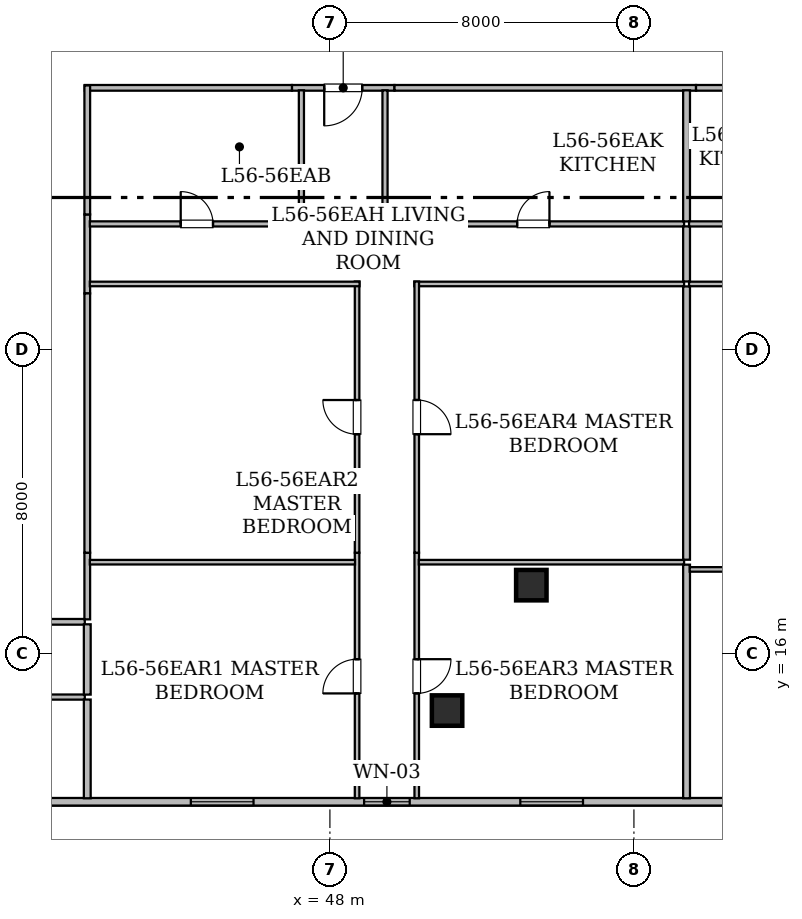
"""IFC4 building model, lengths in metres.
Left out: names, types, materials, properties, quantities, classifications, styles, units other than length and angle.
Written with IfcOpenShell. Run it as: python <this file> out.ifc"""

import sys

from ifc_helpers import new_model, si_unit, direction, frame, frame_2d, origin, origin_2d, place, context, subcontext, project, spatial, rectangle, hollow_rectangle, extrude, element, fill, save


model = new_model("IFC4")
c1 = context("Model", 3, precision=1e-05, world=origin(), true_north=direction((0.0, 1.0)))
c2 = subcontext(c1, "Body", "Model", "MODEL_VIEW")
j1 = project(units=[si_unit("LENGTHUNIT", "METRE"), si_unit("PLANEANGLEUNIT", "RADIAN")], contexts=[c1])
p1 = place(None, origin())
s1 = spatial("IfcSite", under=j1, at=p1, CompositionType="ELEMENT")
p2 = place(p1, origin())
s2 = spatial("IfcBuilding", under=s1, at=p2, CompositionType="ELEMENT")
p3 = place(p2, frame((0.0, 0.0, 220.85)))
s3 = spatial("IfcBuildingStorey", under=s2, at=p3, CompositionType="ELEMENT", Elevation=220.85)
for number, where, z_axis, x_axis in (
    (1, (51.083, 14.5, 0.0), (0.0, 0.0, 1.0), (1.0, 0.0, 0.0)),
    (2, (53.3, 17.8, 0.0), (0.0, 0.0, 1.0), (1.0, 0.0, 0.0)),
):
    element("IfcColumn", number, at=place(p3, frame(where, z_axis=z_axis, x_axis=x_axis)), inside=s3, PredefinedType="COLUMN", context=c2, shape_type="SweptSolid", body=[
        extrude(hollow_rectangle(XDim=0.8, YDim=0.8, WallThickness=0.04, at=origin_2d()), origin(), (0.0, 0.0, 1.0), 3.65),
    ])
p4 = place(p3, frame((65.696, 12.1, 0.0), z_axis=(0.0, 0.0, 1.0), x_axis=(-1.0, 0.0, 0.0)))
e3 = element("IfcWall", 3, at=p4, inside=s3, PredefinedType="STANDARD", context=c2, shape_type="SweptSolid", body=[
    extrude(rectangle(XDim=41.393, YDim=0.2, at=frame_2d((20.697, 0.0))), origin(), (0.0, 0.0, 1.0), 3.43),
])
p5 = place(p4, frame((34.521, 0.0, 0.85)))
e4 = element("IfcOpeningElement", 4, at=p5, cuts=e3, PredefinedType="OPENING", context=c2, shape_type="SweptSolid", body=[
    extrude(rectangle(XDim=1.65, YDim=1.55, at=frame_2d((0.825, 0.775))), frame((0.0, 0.11, 0.0), z_axis=(0.0, -1.0, 0.0), x_axis=(1.0, 0.0, 0.0)), (0.0, 0.0, 1.0), 0.22),
])
p6 = place(p4, frame((39.14, 0.0, 0.85)))
e5 = element("IfcOpeningElement", 5, at=p6, cuts=e3, PredefinedType="OPENING", context=c2, shape_type="SweptSolid", body=[
    extrude(rectangle(XDim=1.65, YDim=1.55, at=frame_2d((0.825, 0.775))), frame((0.0, 0.11, 0.0), z_axis=(0.0, -1.0, 0.0), x_axis=(1.0, 0.0, 0.0)), (0.0, 0.0, 1.0), 0.22),
])
p7 = place(p4, frame((15.596, 0.0, 0.8)))
e6 = element("IfcOpeningElement", 6, at=p7, cuts=e3, PredefinedType="OPENING", context=c2, shape_type="SweptSolid", body=[
    extrude(rectangle(XDim=1.2, YDim=1.5, at=frame_2d((0.6, 0.75))), frame((0.0, 0.11, 0.0), z_axis=(0.0, -1.0, 0.0), x_axis=(1.0, 0.0, 0.0)), (0.0, 0.0, 1.0), 0.22),
])
p8 = place(p4, frame((19.706, 0.0, 0.85)))
e7 = element("IfcOpeningElement", 7, at=p8, cuts=e3, PredefinedType="OPENING", context=c2, shape_type="SweptSolid", body=[
    extrude(rectangle(XDim=1.65, YDim=1.55, at=frame_2d((0.825, 0.775))), frame((0.0, 0.11, 0.0), z_axis=(0.0, -1.0, 0.0), x_axis=(1.0, 0.0, 0.0)), (0.0, 0.0, 1.0), 0.22),
])
p9 = place(p4, frame((11.036, 0.0, 0.85)))
e8 = element("IfcOpeningElement", 8, at=p9, cuts=e3, PredefinedType="OPENING", context=c2, shape_type="SweptSolid", body=[
    extrude(rectangle(XDim=1.65, YDim=1.55, at=frame_2d((0.825, 0.775))), frame((0.0, 0.11, 0.0), z_axis=(0.0, -1.0, 0.0), x_axis=(1.0, 0.0, 0.0)), (0.0, 0.0, 1.0), 0.22),
])
p10 = place(p4, frame((4.786, 0.0, 0.85)))
e9 = element("IfcOpeningElement", 9, at=p10, cuts=e3, PredefinedType="OPENING", context=c2, shape_type="SweptSolid", body=[
    extrude(rectangle(XDim=1.65, YDim=1.55, at=frame_2d((0.825, 0.775))), frame((0.0, 0.11, 0.0), z_axis=(0.0, -1.0, 0.0), x_axis=(1.0, 0.0, 0.0)), (0.0, 0.0, 1.0), 0.22),
])
p11 = place(p3, frame((41.55, 16.835, 0.0), z_axis=(0.0, 0.0, 1.0), x_axis=(-1.0, 0.0, 0.0)))
e10 = element("IfcWall", 10, at=p11, inside=s3, PredefinedType="STANDARD", context=c2, shape_type="SweptSolid", body=[
    extrude(rectangle(XDim=7.436, YDim=0.15, at=frame_2d((3.718, 0.0))), origin(), (0.0, 0.0, 1.0), 2.725),
])
p12 = place(p11, frame((3.218, 0.0, 0.0)))
e11 = element("IfcOpeningElement", 11, at=p12, cuts=e10, PredefinedType="OPENING", context=c2, shape_type="SweptSolid", body=[
    extrude(rectangle(XDim=1.0, YDim=2.15, at=frame_2d((0.5, 1.075))), frame((0.0, 0.085, 0.0), z_axis=(0.0, -1.0, 0.0), x_axis=(1.0, 0.0, 0.0)), (0.0, 0.0, 1.0), 0.17),
])
p13 = place(p3, frame((49.699, 30.885, 0.0), z_axis=(0.0, 0.0, 1.0), x_axis=(-1.0, 0.0, 0.0)))
e12 = element("IfcWall", 12, at=p13, inside=s3, PredefinedType="STANDARD", context=c2, shape_type="SweptSolid", body=[
    extrude(rectangle(XDim=2.698, YDim=0.15, at=frame_2d((1.349, 0.0))), origin(), (0.0, 0.0, 1.0), 3.43),
])
p14 = place(p13, frame((0.849, 0.0, 0.0)))
e13 = element("IfcOpeningElement", 13, at=p14, cuts=e12, PredefinedType="OPENING", context=c2, shape_type="SweptSolid", body=[
    extrude(rectangle(XDim=1.0, YDim=2.15, at=frame_2d((0.5, 1.075))), frame((0.0, 0.085, 0.0), z_axis=(0.0, -1.0, 0.0), x_axis=(1.0, 0.0, 0.0)), (0.0, 0.0, 1.0), 0.17),
])
p15 = place(p3, frame((41.615, 27.554, 0.0), z_axis=(0.0, 0.0, 1.0), x_axis=(0.0, -1.0, 0.0)))
e14 = element("IfcWall", 14, at=p15, inside=s3, PredefinedType="STANDARD", context=c2, shape_type="SweptSolid", body=[
    extrude(rectangle(XDim=2.078, YDim=0.15, at=frame_2d((1.039, 0.0))), origin(), (0.0, 0.0, 1.0), 3.43),
])
p16 = place(p3, frame((47.001, 30.885, 0.0), z_axis=(0.0, 0.0, 1.0), x_axis=(-1.0, 0.0, 0.0)))
e15 = element("IfcWall", 15, at=p16, inside=s3, PredefinedType="STANDARD", context=c2, shape_type="SweptSolid", body=[
    extrude(rectangle(XDim=5.451, YDim=0.15, at=frame_2d((2.726, 0.0))), origin(), (0.0, 0.0, 1.0), 3.43),
])
p17 = place(p3, frame((41.615, 30.948, 0.0), z_axis=(0.0, 0.0, 1.0), x_axis=(0.0, -1.0, 0.0)))
e16 = element("IfcWall", 16, at=p17, inside=s3, PredefinedType="STANDARD", context=c2, shape_type="SweptSolid", body=[
    extrude(rectangle(XDim=3.394, YDim=0.15, at=frame_2d((1.697, 0.0))), origin(), (0.0, 0.0, 1.0), 3.43),
])
p18 = place(p3, frame((57.634, 30.885, 0.0), z_axis=(0.0, 0.0, 1.0), x_axis=(-1.0, 0.0, 0.0)))
e17 = element("IfcWall", 17, at=p18, inside=s3, PredefinedType="STANDARD", context=c2, shape_type="SweptSolid", body=[
    extrude(rectangle(XDim=7.935, YDim=0.15, at=frame_2d((3.968, 0.0))), origin(), (0.0, 0.0, 1.0), 2.725),
])
p19 = place(p3, frame((41.615, 18.653, 0.0), z_axis=(0.0, 0.0, 1.0), x_axis=(0.0, -1.0, 0.0)))
e18 = element("IfcWall", 18, at=p19, inside=s3, PredefinedType="STANDARD", context=c2, shape_type="SweptSolid", body=[
    extrude(rectangle(XDim=1.753, YDim=0.15, at=frame_2d((0.876, 0.0))), origin(), (0.0, 0.0, 1.0), 2.725),
])
p20 = place(p3, frame((41.615, 25.476, 0.0), z_axis=(0.0, 0.0, 1.0), x_axis=(0.0, -1.0, 0.0)))
e19 = element("IfcWall", 19, at=p20, inside=s3, PredefinedType="STANDARD", context=c2, shape_type="SweptSolid", body=[
    extrude(rectangle(XDim=6.823, YDim=0.15, at=frame_2d((3.412, 0.0))), origin(), (0.0, 0.0, 1.0), 2.725),
])
p21 = place(p3, frame((62.142, 30.885, 0.0), z_axis=(0.0, 0.0, 1.0), x_axis=(-1.0, 0.0, 0.0)))
e20 = element("IfcWall", 20, at=p21, inside=s3, PredefinedType="STANDARD", context=c2, shape_type="SweptSolid", body=[
    extrude(rectangle(XDim=4.508, YDim=0.15, at=frame_2d((2.254, 0.0))), origin(), (0.0, 0.0, 1.0), 3.43),
])
p22 = place(p3, frame((41.55, 14.855, 0.0), z_axis=(0.0, 0.0, 1.0), x_axis=(-1.0, 0.0, 0.0)))
e21 = element("IfcWall", 21, at=p22, inside=s3, PredefinedType="PARTITIONING", context=c2, shape_type="SweptSolid", body=[
    extrude(rectangle(XDim=3.713, YDim=0.135, at=frame_2d((1.856, 0.0))), origin(), (0.0, 0.0, 1.0), 2.725),
])
p23 = place(p22, frame((1.221, 0.0, 0.0)))
e22 = element("IfcOpeningElement", 22, at=p23, cuts=e21, PredefinedType="OPENING", context=c2, shape_type="SweptSolid", body=[
    extrude(rectangle(XDim=0.85, YDim=2.1, at=frame_2d((0.425, 1.05))), frame((0.0, 0.077, 0.0), z_axis=(0.0, -1.0, 0.0), x_axis=(1.0, 0.0, 0.0)), (0.0, 0.0, 1.0), 0.155),
])
p24 = place(p3, frame((41.615, 16.77, 0.0), z_axis=(0.0, 0.0, 1.0), x_axis=(0.0, -1.0, 0.0)))
e23 = element("IfcWall", 23, at=p24, inside=s3, PredefinedType="STANDARD", context=c2, shape_type="SweptSolid", body=[
    extrude(rectangle(XDim=1.85, YDim=0.18, at=frame_2d((0.925, 0.0))), origin(), (0.0, 0.0, 1.0), 3.065),
])
p25 = place(p3, frame((41.615, 14.79, 0.0), z_axis=(0.0, 0.0, 1.0), x_axis=(0.0, -1.0, 0.0)))
e24 = element("IfcWall", 24, at=p25, inside=s3, PredefinedType="STANDARD", context=c2, shape_type="SweptSolid", body=[
    extrude(rectangle(XDim=2.598, YDim=0.18, at=frame_2d((1.299, 0.0))), origin(), (0.0, 0.0, 1.0), 2.887),
])
p26 = place(p3, frame((41.682, 27.305, 0.0), z_axis=(0.0, 0.0, 1.0), x_axis=(1.0, 0.0, 0.0)))
e25 = element("IfcWall", 25, at=p26, inside=s3, PredefinedType="PARTITIONING", context=c2, shape_type="SweptSolid", body=[
    extrude(rectangle(XDim=5.633, YDim=0.135, at=frame_2d((2.816, 0.0))), origin(), (0.0, 0.0, 1.0), 3.43),
])
p27 = place(p26, frame((2.392, 0.0, 0.0)))
e26 = element("IfcOpeningElement", 26, at=p27, cuts=e25, PredefinedType="OPENING", context=c2, shape_type="SweptSolid", body=[
    extrude(rectangle(XDim=0.85, YDim=2.1, at=frame_2d((0.425, 1.05))), frame((0.0, 0.077, 0.0), z_axis=(0.0, -1.0, 0.0), x_axis=(1.0, 0.0, 0.0)), (0.0, 0.0, 1.0), 0.155),
])
for number, where, z_axis, x_axis in (
    (27, (47.25, 27.24, 0.0), (0.0, 0.0, 1.0), (0.0, 1.0, 0.0)),
    (28, (49.45, 30.82, 0.0), (0.0, 0.0, 1.0), (0.0, -1.0, 0.0)),
):
    element("IfcWall", number, at=place(p3, frame(where, z_axis=z_axis, x_axis=x_axis)), inside=s3, PredefinedType="PARTITIONING", context=c2, shape_type="SweptSolid", body=[
        extrude(rectangle(XDim=3.58, YDim=0.135, at=frame_2d((1.79, 0.0))), origin(), (0.0, 0.0, 1.0), 3.43),
    ])
p28 = place(p3, frame((49.385, 27.305, 0.0), z_axis=(0.0, 0.0, 1.0), x_axis=(1.0, 0.0, 0.0)))
e29 = element("IfcWall", 29, at=p28, inside=s3, PredefinedType="PARTITIONING", context=c2, shape_type="SweptSolid", body=[
    extrude(rectangle(XDim=7.935, YDim=0.135, at=frame_2d((3.968, 0.0))), origin(), (0.0, 0.0, 1.0), 2.725),
])
p29 = place(p28, frame((3.542, 0.0, 0.0)))
e30 = element("IfcOpeningElement", 30, at=p29, cuts=e29, PredefinedType="OPENING", context=c2, shape_type="SweptSolid", body=[
    extrude(rectangle(XDim=0.85, YDim=2.1, at=frame_2d((0.425, 1.05))), frame((0.0, 0.077, 0.0), z_axis=(0.0, -1.0, 0.0), x_axis=(1.0, 0.0, 0.0)), (0.0, 0.0, 1.0), 0.155),
])
p30 = place(p3, frame((48.715, 12.192, 0.0), z_axis=(0.0, 0.0, 1.0), x_axis=(0.0, 1.0, 0.0)))
e31 = element("IfcWall", 31, at=p30, inside=s3, PredefinedType="PARTITIONING", context=c2, shape_type="SweptSolid", body=[
    extrude(rectangle(XDim=6.461, YDim=0.12, at=frame_2d((3.23, 0.0))), origin(), (0.0, 0.0, 1.0), 2.725),
])
p31 = place(p30, frame((2.759, 0.0, 0.0)))
e32 = element("IfcOpeningElement", 32, at=p31, cuts=e31, PredefinedType="OPENING", context=c2, shape_type="SweptSolid", body=[
    extrude(rectangle(XDim=0.9, YDim=2.1, at=frame_2d((0.45, 1.05))), frame((0.0, 0.07, 0.0), z_axis=(0.0, -1.0, 0.0), x_axis=(1.0, 0.0, 0.0)), (0.0, 0.0, 1.0), 0.14),
])
p32 = place(p3, frame((48.715, 18.653, 0.0), z_axis=(0.0, 0.0, 1.0), x_axis=(0.0, 1.0, 0.0)))
e33 = element("IfcWall", 33, at=p32, inside=s3, PredefinedType="PARTITIONING", context=c2, shape_type="SweptSolid", body=[
    extrude(rectangle(XDim=7.137, YDim=0.12, at=frame_2d((3.568, 0.0))), origin(), (0.0, 0.0, 1.0), 3.43),
])
p33 = place(p32, frame((3.118, 0.0, 0.0)))
e34 = element("IfcOpeningElement", 34, at=p33, cuts=e33, PredefinedType="OPENING", context=c2, shape_type="SweptSolid", body=[
    extrude(rectangle(XDim=0.9, YDim=2.1, at=frame_2d((0.45, 1.05))), frame((0.0, 0.07, 0.0), z_axis=(0.0, -1.0, 0.0), x_axis=(1.0, 0.0, 0.0)), (0.0, 0.0, 1.0), 0.14),
])
p34 = place(p3, frame((48.78, 25.725, 0.0), z_axis=(0.0, 0.0, 1.0), x_axis=(-1.0, 0.0, 0.0)))
e35 = element("IfcWall", 35, at=p34, inside=s3, PredefinedType="PARTITIONING", context=c2, shape_type="SweptSolid", body=[
    extrude(rectangle(XDim=7.098, YDim=0.12, at=frame_2d((3.549, 0.0))), origin(), (0.0, 0.0, 1.0), 3.43),
])
p35 = place(p3, frame((50.285, 18.653, 0.0), z_axis=(0.0, 0.0, 1.0), x_axis=(0.0, -1.0, 0.0)))
e36 = element("IfcWall", 36, at=p35, inside=s3, PredefinedType="PARTITIONING", context=c2, shape_type="SweptSolid", body=[
    extrude(rectangle(XDim=6.461, YDim=0.12, at=frame_2d((3.23, 0.0))), origin(), (0.0, 0.0, 1.0), 2.725),
])
p36 = place(p35, frame((2.801, 0.0, 0.0)))
e37 = element("IfcOpeningElement", 37, at=p36, cuts=e36, PredefinedType="OPENING", context=c2, shape_type="SweptSolid", body=[
    extrude(rectangle(XDim=0.9, YDim=2.1, at=frame_2d((0.45, 1.05))), frame((0.0, 0.07, 0.0), z_axis=(0.0, -1.0, 0.0), x_axis=(1.0, 0.0, 0.0)), (0.0, 0.0, 1.0), 0.14),
])
p37 = place(p3, frame((57.32, 25.725, 0.0), z_axis=(0.0, 0.0, 1.0), x_axis=(-1.0, 0.0, 0.0)))
e38 = element("IfcWall", 38, at=p37, inside=s3, PredefinedType="PARTITIONING", context=c2, shape_type="SweptSolid", body=[
    extrude(rectangle(XDim=7.1, YDim=0.12, at=frame_2d((3.55, 0.0))), origin(), (0.0, 0.0, 1.0), 2.725),
])
p38 = place(p3, frame((50.285, 25.79, 0.0), z_axis=(0.0, 0.0, 1.0), x_axis=(0.0, -1.0, 0.0)))
e39 = element("IfcWall", 39, at=p38, inside=s3, PredefinedType="PARTITIONING", context=c2, shape_type="SweptSolid", body=[
    extrude(rectangle(XDim=7.137, YDim=0.12, at=frame_2d((3.568, 0.0))), origin(), (0.0, 0.0, 1.0), 3.43),
])
p39 = place(p38, frame((3.118, 0.0, 0.0)))
e40 = element("IfcOpeningElement", 40, at=p39, cuts=e39, PredefinedType="OPENING", context=c2, shape_type="SweptSolid", body=[
    extrude(rectangle(XDim=0.9, YDim=2.1, at=frame_2d((0.45, 1.05))), frame((0.0, 0.07, 0.0), z_axis=(0.0, -1.0, 0.0), x_axis=(1.0, 0.0, 0.0)), (0.0, 0.0, 1.0), 0.14),
])
p40 = place(p3, frame((57.385, 27.24, 0.0), z_axis=(0.0, 0.0, 1.0), x_axis=(0.0, -1.0, 0.0)))
e41 = element("IfcWall", 41, at=p40, inside=s3, PredefinedType="STANDARD", context=c2, shape_type="SweptSolid", body=[
    extrude(rectangle(XDim=1.45, YDim=0.18, at=frame_2d((0.725, 0.0))), origin(), (0.0, 0.0, 1.0), 3.43),
])
p41 = place(p3, frame((57.385, 30.82, 0.0), z_axis=(0.0, 0.0, 1.0), x_axis=(0.0, -1.0, 0.0)))
e42 = element("IfcWall", 42, at=p41, inside=s3, PredefinedType="STANDARD", context=c2, shape_type="SweptSolid", body=[
    extrude(rectangle(XDim=3.45, YDim=0.18, at=frame_2d((1.725, 0.0))), origin(), (0.0, 0.0, 1.0), 3.43),
])
p42 = place(p3, frame((41.682, 18.404, 0.0), z_axis=(0.0, 0.0, 1.0), x_axis=(1.0, 0.0, 0.0)))
e43 = element("IfcWall", 43, at=p42, inside=s3, PredefinedType="PARTITIONING", context=c2, shape_type="SweptSolid", body=[
    extrude(rectangle(XDim=6.979, YDim=0.12, at=frame_2d((3.49, 0.0))), origin(), (0.0, 0.0, 1.0), 2.725),
])
p43 = place(p3, frame((50.339, 18.404, 0.0), z_axis=(0.0, 0.0, 1.0), x_axis=(1.0, 0.0, 0.0)))
e44 = element("IfcWall", 44, at=p43, inside=s3, PredefinedType="PARTITIONING", context=c2, shape_type="SweptSolid", body=[
    extrude(rectangle(XDim=6.981, YDim=0.12, at=frame_2d((3.49, 0.0))), origin(), (0.0, 0.0, 1.0), 2.725),
])
p44 = place(p3, frame((57.385, 18.339, 0.0), z_axis=(0.0, 0.0, 1.0), x_axis=(0.0, -1.0, 0.0)))
e45 = element("IfcWall", 45, at=p44, inside=s3, PredefinedType="STANDARD", context=c2, shape_type="SweptSolid", body=[
    extrude(rectangle(XDim=6.147, YDim=0.18, at=frame_2d((3.074, 0.0))), origin(), (0.0, 0.0, 1.0), 2.725),
])
p45 = place(p3, frame((57.385, 25.66, 0.0), z_axis=(0.0, 0.0, 1.0), x_axis=(0.0, -1.0, 0.0)))
e46 = element("IfcWall", 46, at=p45, inside=s3, PredefinedType="STANDARD", context=c2, shape_type="SweptSolid", body=[
    extrude(rectangle(XDim=7.191, YDim=0.18, at=frame_2d((3.595, 0.0))), origin(), (0.0, 0.0, 1.0), 2.725),
])
p46 = place(p3, frame((57.45, 27.305, 0.0), z_axis=(0.0, 0.0, 1.0), x_axis=(1.0, 0.0, 0.0)))
e47 = element("IfcWall", 47, at=p46, inside=s3, PredefinedType="PARTITIONING", context=c2, shape_type="SweptSolid", body=[
    extrude(rectangle(XDim=5.006, YDim=0.135, at=frame_2d((2.503, 0.0))), origin(), (0.0, 0.0, 1.0), 3.43),
])
p47 = place(p46, frame((2.078, 0.0, 0.0)))
e48 = element("IfcOpeningElement", 48, at=p47, cuts=e47, PredefinedType="OPENING", context=c2, shape_type="SweptSolid", body=[
    extrude(rectangle(XDim=0.85, YDim=2.1, at=frame_2d((0.425, 1.05))), frame((0.0, 0.077, 0.0), z_axis=(0.0, -1.0, 0.0), x_axis=(1.0, 0.0, 0.0)), (0.0, 0.0, 1.0), 0.155),
])
p48 = place(p3, frame((62.85, 25.725, 0.0), z_axis=(0.0, 0.0, 1.0), x_axis=(-1.0, 0.0, 0.0)))
e49 = element("IfcWall", 49, at=p48, inside=s3, PredefinedType="PARTITIONING", context=c2, shape_type="SweptSolid", body=[
    extrude(rectangle(XDim=5.4, YDim=0.12, at=frame_2d((2.7, 0.0))), origin(), (0.0, 0.0, 1.0), 3.43),
])
p49 = place(p3, frame((57.467, 18.214, 0.0), z_axis=(0.0, 0.0, 1.0), x_axis=(1.0, 0.0, 0.0)))
e50 = element("IfcWall", 50, at=p49, inside=s3, PredefinedType="PARTITIONING", context=c2, shape_type="SweptSolid", body=[
    extrude(rectangle(XDim=5.264, YDim=0.12, at=frame_2d((2.632, 0.0))), origin(), (0.0, 0.0, 1.0), 3.43),
])
p50 = place(p7, origin())
e51 = element("IfcWindow", 51, at=p50, inside=s3, PartitioningType="SINGLE_PANEL", PredefinedType="WINDOW", context=c2, shape_type="SweptSolid", body=[
    extrude(rectangle(XDim=1.2, YDim=1.5, at=frame_2d((0.6, 0.75))), frame((0.0, 0.03, 0.0), z_axis=(0.0, -1.0, 0.0), x_axis=(1.0, 0.0, 0.0)), (0.0, 0.0, 1.0), 0.06),
])
fill(e6, e51)
p51 = place(p8, origin())
e52 = element("IfcWindow", 52, at=p51, inside=s3, PartitioningType="SINGLE_PANEL", PredefinedType="WINDOW", context=c2, shape_type="SweptSolid", body=[
    extrude(rectangle(XDim=1.65, YDim=1.55, at=frame_2d((0.825, 0.775))), frame((0.0, 0.03, 0.0), z_axis=(0.0, -1.0, 0.0), x_axis=(1.0, 0.0, 0.0)), (0.0, 0.0, 1.0), 0.06),
])
fill(e7, e52)
p52 = place(p9, origin())
e53 = element("IfcWindow", 53, at=p52, inside=s3, PartitioningType="SINGLE_PANEL", PredefinedType="WINDOW", context=c2, shape_type="SweptSolid", body=[
    extrude(rectangle(XDim=1.65, YDim=1.55, at=frame_2d((0.825, 0.775))), frame((0.0, 0.03, 0.0), z_axis=(0.0, -1.0, 0.0), x_axis=(1.0, 0.0, 0.0)), (0.0, 0.0, 1.0), 0.06),
])
fill(e8, e53)
p53 = place(p14, origin())
e54 = element("IfcDoor", 54, at=p53, inside=s3, OperationType="SINGLE_SWING_RIGHT", PredefinedType="DOOR", context=c2, shape_type="SweptSolid", body=[
    extrude(rectangle(XDim=1.0, YDim=2.15, at=frame_2d((0.5, 1.075))), frame((0.0, 0.025, 0.0), z_axis=(0.0, -1.0, 0.0), x_axis=(1.0, 0.0, 0.0)), (0.0, 0.0, 1.0), 0.05),
])
fill(e13, e54)
p54 = place(p27, origin())
e55 = element("IfcDoor", 55, at=p54, inside=s3, OperationType="SINGLE_SWING_LEFT", PredefinedType="DOOR", context=c2, shape_type="SweptSolid", body=[
    extrude(rectangle(XDim=0.85, YDim=2.1, at=frame_2d((0.425, 1.05))), frame((0.0, 0.025, 0.0), z_axis=(0.0, -1.0, 0.0), x_axis=(1.0, 0.0, 0.0)), (0.0, 0.0, 1.0), 0.05),
])
fill(e26, e55)
p55 = place(p29, origin())
e56 = element("IfcDoor", 56, at=p55, inside=s3, OperationType="SINGLE_SWING_RIGHT", PredefinedType="DOOR", context=c2, shape_type="SweptSolid", body=[
    extrude(rectangle(XDim=0.85, YDim=2.1, at=frame_2d((0.425, 1.05))), frame((0.0, 0.025, 0.0), z_axis=(0.0, -1.0, 0.0), x_axis=(1.0, 0.0, 0.0)), (0.0, 0.0, 1.0), 0.05),
])
fill(e30, e56)
p56 = place(p31, origin())
e57 = element("IfcDoor", 57, at=p56, inside=s3, OperationType="SINGLE_SWING_LEFT", PredefinedType="DOOR", context=c2, shape_type="SweptSolid", body=[
    extrude(rectangle(XDim=0.9, YDim=2.1, at=frame_2d((0.45, 1.05))), frame((0.0, 0.025, 0.0), z_axis=(0.0, -1.0, 0.0), x_axis=(1.0, 0.0, 0.0)), (0.0, 0.0, 1.0), 0.05),
])
fill(e32, e57)
p57 = place(p33, origin())
e58 = element("IfcDoor", 58, at=p57, inside=s3, OperationType="SINGLE_SWING_RIGHT", PredefinedType="DOOR", context=c2, shape_type="SweptSolid", body=[
    extrude(rectangle(XDim=0.9, YDim=2.1, at=frame_2d((0.45, 1.05))), frame((0.0, 0.025, 0.0), z_axis=(0.0, -1.0, 0.0), x_axis=(1.0, 0.0, 0.0)), (0.0, 0.0, 1.0), 0.05),
])
fill(e34, e58)
p58 = place(p36, origin())
e59 = element("IfcDoor", 59, at=p58, inside=s3, OperationType="SINGLE_SWING_LEFT", PredefinedType="DOOR", context=c2, shape_type="SweptSolid", body=[
    extrude(rectangle(XDim=0.9, YDim=2.1, at=frame_2d((0.45, 1.05))), frame((0.0, 0.025, 0.0), z_axis=(0.0, -1.0, 0.0), x_axis=(1.0, 0.0, 0.0)), (0.0, 0.0, 1.0), 0.05),
])
fill(e37, e59)
p59 = place(p39, origin())
e60 = element("IfcDoor", 60, at=p59, inside=s3, OperationType="SINGLE_SWING_RIGHT", PredefinedType="DOOR", context=c2, shape_type="SweptSolid", body=[
    extrude(rectangle(XDim=0.9, YDim=2.1, at=frame_2d((0.45, 1.05))), frame((0.0, 0.025, 0.0), z_axis=(0.0, -1.0, 0.0), x_axis=(1.0, 0.0, 0.0)), (0.0, 0.0, 1.0), 0.05),
])
fill(e40, e60)
save(model, sys.argv[1])
